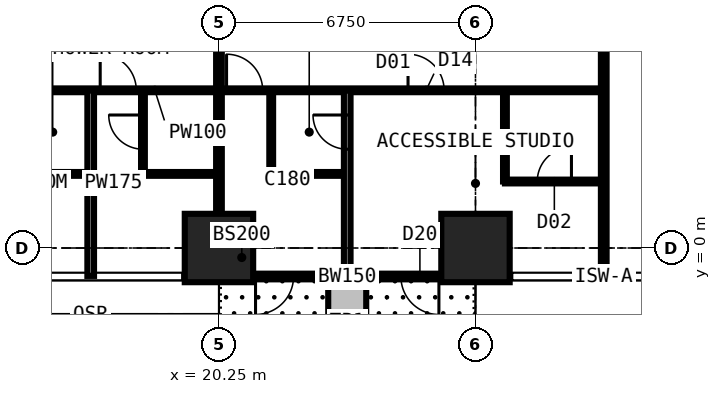
"""IFC4 building model, lengths in metres.
Left out: names, types, materials, properties, quantities, classifications, styles, units other than length and angle.
Written with IfcOpenShell. Run it as: python <this file> out.ifc"""

import sys

from ifc_helpers import new_model, si_unit, direction, frame, frame_2d, origin, origin_2d, place, context, subcontext, project, spatial, rectangle, extrude, element, fill, save


model = new_model("IFC4")
c1 = context("Model", 3, precision=1e-05, world=origin(), true_north=direction((0.0, 1.0)))
c2 = subcontext(c1, "Body", "Model", "MODEL_VIEW")
j1 = project(units=[si_unit("LENGTHUNIT", "METRE"), si_unit("PLANEANGLEUNIT", "RADIAN")], contexts=[c1])
p1 = place(None, origin())
s1 = spatial("IfcSite", under=j1, at=p1, CompositionType="ELEMENT")
p2 = place(p1, origin())
s2 = spatial("IfcBuilding", under=s1, at=p2, CompositionType="ELEMENT")
p3 = place(p2, frame((0.0, 0.0, 57.6)))
s3 = spatial("IfcBuildingStorey", under=s2, at=p3, CompositionType="ELEMENT", Elevation=57.6)
for number, where, z_axis, x_axis in (
    (1, (20.25, 0.0, 0.0), (0.0, 0.0, 1.0), (1.0, 0.0, 0.0)),
    (2, (27.0, 0.0, 0.0), (0.0, 0.0, 1.0), (1.0, 0.0, 0.0)),
):
    element("IfcColumn", number, at=place(p3, frame(where, z_axis=z_axis, x_axis=x_axis)), inside=s3, PredefinedType="COLUMN", context=c2, shape_type="SweptSolid", body=[
        extrude(rectangle(XDim=1.8, YDim=1.8, at=origin_2d()), origin(), (0.0, 0.0, 1.0), 3.6),
    ])
p4 = place(p3, frame((27.0, -0.75, 0.0), z_axis=(0.0, 0.0, 1.0), x_axis=(-1.0, 0.0, 0.0)))
e3 = element("IfcWall", 3, at=p4, inside=s3, PredefinedType="SOLIDWALL", context=c2, shape_type="SweptSolid", body=[
    extrude(rectangle(XDim=6.75, YDim=0.15, at=frame_2d((3.375, 0.0))), origin(), (0.0, 0.0, 1.0), 3.375),
])
p5 = place(p4, frame((0.962, 0.0, 0.0)))
e4 = element("IfcOpeningElement", 4, at=p5, cuts=e3, PredefinedType="OPENING", context=c2, shape_type="SweptSolid", body=[
    extrude(rectangle(XDim=1.0, YDim=2.2, at=frame_2d((0.5, 1.1))), frame((0.0, 0.085, 0.0), z_axis=(0.0, -1.0, 0.0), x_axis=(1.0, 0.0, 0.0)), (0.0, 0.0, 1.0), 0.17),
])
p6 = place(p4, frame((2.025, 0.0, 0.9)))
e5 = element("IfcOpeningElement", 5, at=p6, cuts=e3, PredefinedType="OPENING", context=c2, shape_type="SweptSolid", body=[
    extrude(rectangle(XDim=1.2, YDim=1.8, at=frame_2d((0.6, 0.9))), frame((0.0, 0.085, 0.0), z_axis=(0.0, -1.0, 0.0), x_axis=(1.0, 0.0, 0.0)), (0.0, 0.0, 1.0), 0.17),
])
p7 = place(p4, frame((4.788, 0.0, 0.0)))
e6 = element("IfcOpeningElement", 6, at=p7, cuts=e3, PredefinedType="OPENING", context=c2, shape_type="SweptSolid", body=[
    extrude(rectangle(XDim=1.0, YDim=2.2, at=frame_2d((0.5, 1.1))), frame((0.0, 0.085, 0.0), z_axis=(0.0, -1.0, 0.0), x_axis=(1.0, 0.0, 0.0)), (0.0, 0.0, 1.0), 0.17),
])
p8 = place(p4, frame((3.525, 0.0, 0.9)))
e7 = element("IfcOpeningElement", 7, at=p8, cuts=e3, PredefinedType="OPENING", context=c2, shape_type="SweptSolid", body=[
    extrude(rectangle(XDim=1.2, YDim=1.8, at=frame_2d((0.6, 0.9))), frame((0.0, 0.085, 0.0), z_axis=(0.0, -1.0, 0.0), x_axis=(1.0, 0.0, 0.0)), (0.0, 0.0, 1.0), 0.17),
])
p9 = place(p3, frame((23.625, -0.85, 0.0), z_axis=(0.0, 0.0, 1.0), x_axis=(0.0, -1.0, 0.0)))
e8 = element("IfcWall", 8, at=p9, inside=s3, PredefinedType="USERDEFINED", context=c2, shape_type="SweptSolid", body=[
    extrude(rectangle(XDim=2.2, YDim=1.0, at=frame_2d((1.1, 0.0))), origin(), (0.0, 0.0, 1.0), 0.9),
])
p10 = place(p3, frame((6.75, 4.15, 0.0), z_axis=(0.0, 0.0, 1.0), x_axis=(1.0, 0.0, 0.0)))
e9 = element("IfcWall", 9, at=p10, inside=s3, PredefinedType="PARTITIONING", context=c2, shape_type="SweptSolid", body=[
    extrude(rectangle(XDim=23.625, YDim=0.1, at=frame_2d((11.812, 0.0))), origin(), (0.0, 0.0, 1.0), 3.375),
])
p11 = place(p10, frame((2.85, 0.0, 0.0)))
e10 = element("IfcOpeningElement", 10, at=p11, cuts=e9, PredefinedType="OPENING", context=c2, shape_type="SweptSolid", body=[
    extrude(rectangle(XDim=1.0, YDim=2.2, at=frame_2d((0.5, 1.1))), frame((0.0, 0.06, 0.0), z_axis=(0.0, -1.0, 0.0), x_axis=(1.0, 0.0, 0.0)), (0.0, 0.0, 1.0), 0.12),
])
p12 = place(p10, frame((6.95, 0.0, 0.0)))
e11 = element("IfcOpeningElement", 11, at=p12, cuts=e9, PredefinedType="OPENING", context=c2, shape_type="SweptSolid", body=[
    extrude(rectangle(XDim=0.95, YDim=2.2, at=frame_2d((0.475, 1.1))), frame((0.0, 0.06, 0.0), z_axis=(0.0, -1.0, 0.0), x_axis=(1.0, 0.0, 0.0)), (0.0, 0.0, 1.0), 0.12),
])
p13 = place(p10, frame((10.375, 0.0, 0.0)))
e12 = element("IfcOpeningElement", 12, at=p13, cuts=e9, PredefinedType="OPENING", context=c2, shape_type="SweptSolid", body=[
    extrude(rectangle(XDim=0.95, YDim=2.2, at=frame_2d((0.475, 1.1))), frame((0.0, 0.06, 0.0), z_axis=(0.0, -1.0, 0.0), x_axis=(1.0, 0.0, 0.0)), (0.0, 0.0, 1.0), 0.12),
])
p14 = place(p10, frame((18.475, 0.0, 0.0)))
e13 = element("IfcOpeningElement", 13, at=p14, cuts=e9, PredefinedType="OPENING", context=c2, shape_type="SweptSolid", body=[
    extrude(rectangle(XDim=0.95, YDim=2.2, at=frame_2d((0.475, 1.1))), frame((0.0, 0.06, 0.0), z_axis=(0.0, -1.0, 0.0), x_axis=(1.0, 0.0, 0.0)), (0.0, 0.0, 1.0), 0.12),
])
p15 = place(p10, frame((13.7, 0.0, 0.0)))
e14 = element("IfcOpeningElement", 14, at=p15, cuts=e9, PredefinedType="OPENING", context=c2, shape_type="SweptSolid", body=[
    extrude(rectangle(XDim=0.95, YDim=2.2, at=frame_2d((0.475, 1.1))), frame((0.0, 0.06, 0.0), z_axis=(0.0, -1.0, 0.0), x_axis=(1.0, 0.0, 0.0)), (0.0, 0.0, 1.0), 0.12),
])
p16 = place(p3, frame((14.875, 1.95, 0.0), z_axis=(0.0, 0.0, 1.0), x_axis=(1.0, 0.0, 0.0)))
e15 = element("IfcWall", 15, at=p16, inside=s3, PredefinedType="PARTITIONING", context=c2, shape_type="SweptSolid", body=[
    extrude(rectangle(XDim=2.0, YDim=0.1, at=frame_2d((1.0, 0.0))), origin(), (0.0, 0.0, 1.0), 3.375),
])
p17 = place(p3, frame((16.875, -0.734, 0.0), z_axis=(0.0, 0.0, 1.0), x_axis=(0.0, 1.0, 0.0)))
e16 = element("IfcWall", 16, at=p17, inside=s3, PredefinedType="PARTITIONING", context=c2, shape_type="SweptSolid", body=[
    extrude(rectangle(XDim=4.884, YDim=0.175, at=frame_2d((2.442, 0.0))), origin(), (0.0, 0.0, 1.0), 3.375),
])
p18 = place(p3, frame((18.25, 1.95, 0.0), z_axis=(0.0, 0.0, 1.0), x_axis=(0.0, 1.0, 0.0)))
e17 = element("IfcWall", 17, at=p18, inside=s3, PredefinedType="PARTITIONING", context=c2, shape_type="SweptSolid", body=[
    extrude(rectangle(XDim=2.2, YDim=0.1, at=frame_2d((1.1, 0.0))), origin(), (0.0, 0.0, 1.0), 3.375),
])
p19 = place(p18, frame((0.65, 0.0, 0.0)))
e18 = element("IfcOpeningElement", 18, at=p19, cuts=e17, PredefinedType="OPENING", context=c2, shape_type="SweptSolid", body=[
    extrude(rectangle(XDim=0.9, YDim=2.2, at=frame_2d((0.45, 1.1))), frame((0.0, 0.06, 0.0), z_axis=(0.0, -1.0, 0.0), x_axis=(1.0, 0.0, 0.0)), (0.0, 0.0, 1.0), 0.12),
])
p20 = place(p3, frame((18.25, 1.95, 0.0), z_axis=(0.0, 0.0, 1.0), x_axis=(1.0, 0.0, 0.0)))
e19 = element("IfcWall", 19, at=p20, inside=s3, PredefinedType="PARTITIONING", context=c2, shape_type="SweptSolid", body=[
    extrude(rectangle(XDim=2.0, YDim=0.1, at=frame_2d((1.0, 0.0))), origin(), (0.0, 0.0, 1.0), 3.375),
])
p21 = place(p3, frame((20.25, -0.734, 0.0), z_axis=(0.0, 0.0, 1.0), x_axis=(0.0, 1.0, 0.0)))
e20 = element("IfcWall", 20, at=p21, inside=s3, PredefinedType="PARTITIONING", context=c2, shape_type="SweptSolid", body=[
    extrude(rectangle(XDim=12.034, YDim=0.15, at=frame_2d((6.017, 0.0))), origin(), (0.0, 0.0, 1.0), 2.61),
])
p22 = place(p3, frame((21.625, 1.95, 0.0), z_axis=(0.0, 0.0, 1.0), x_axis=(0.0, 1.0, 0.0)))
e21 = element("IfcWall", 21, at=p22, inside=s3, PredefinedType="PARTITIONING", context=c2, shape_type="SweptSolid", body=[
    extrude(rectangle(XDim=2.2, YDim=0.1, at=frame_2d((1.1, 0.0))), origin(), (0.0, 0.0, 1.0), 3.375),
])
p23 = place(p3, frame((21.625, 1.95, 0.0), z_axis=(0.0, 0.0, 1.0), x_axis=(1.0, 0.0, 0.0)))
e22 = element("IfcWall", 22, at=p23, inside=s3, PredefinedType="PARTITIONING", context=c2, shape_type="SweptSolid", body=[
    extrude(rectangle(XDim=2.0, YDim=0.1, at=frame_2d((1.0, 0.0))), origin(), (0.0, 0.0, 1.0), 3.375),
])
p24 = place(p3, frame((23.625, -0.734, 0.0), z_axis=(0.0, 0.0, 1.0), x_axis=(0.0, 1.0, 0.0)))
e23 = element("IfcWall", 23, at=p24, inside=s3, PredefinedType="PARTITIONING", context=c2, shape_type="SweptSolid", body=[
    extrude(rectangle(XDim=4.884, YDim=0.175, at=frame_2d((2.442, 0.0))), origin(), (0.0, 0.0, 1.0), 3.375),
])
p25 = place(p24, frame((3.334, 0.0, 0.0)))
e24 = element("IfcOpeningElement", 24, at=p25, cuts=e23, PredefinedType="OPENING", context=c2, shape_type="SweptSolid", body=[
    extrude(rectangle(XDim=0.9, YDim=2.2, at=frame_2d((0.45, 1.1))), frame((0.0, 0.097, 0.0), z_axis=(0.0, -1.0, 0.0), x_axis=(1.0, 0.0, 0.0)), (0.0, 0.0, 1.0), 0.195),
])
p26 = place(p3, frame((27.775, 1.75, 0.0), z_axis=(0.0, 0.0, 1.0), x_axis=(0.0, 1.0, 0.0)))
e25 = element("IfcWall", 25, at=p26, inside=s3, PredefinedType="PARTITIONING", context=c2, shape_type="SweptSolid", body=[
    extrude(rectangle(XDim=2.4, YDim=0.1, at=frame_2d((1.2, 0.0))), origin(), (0.0, 0.0, 1.0), 3.375),
])
p27 = place(p3, frame((27.775, 1.75, 0.0), z_axis=(0.0, 0.0, 1.0), x_axis=(1.0, 0.0, 0.0)))
e26 = element("IfcWall", 26, at=p27, inside=s3, PredefinedType="PARTITIONING", context=c2, shape_type="SweptSolid", body=[
    extrude(rectangle(XDim=2.6, YDim=0.1, at=frame_2d((1.3, 0.0))), origin(), (0.0, 0.0, 1.0), 3.375),
])
p28 = place(p27, frame((0.85, 0.0, 0.0)))
e27 = element("IfcOpeningElement", 27, at=p28, cuts=e26, PredefinedType="OPENING", context=c2, shape_type="SweptSolid", body=[
    extrude(rectangle(XDim=0.9, YDim=2.2, at=frame_2d((0.45, 1.1))), frame((0.0, 0.06, 0.0), z_axis=(0.0, -1.0, 0.0), x_axis=(1.0, 0.0, 0.0)), (0.0, 0.0, 1.0), 0.12),
])
p29 = place(p3, frame((30.375, -0.734, 0.0), z_axis=(0.0, 0.0, 1.0), x_axis=(0.0, 1.0, 0.0)))
e28 = element("IfcWall", 28, at=p29, inside=s3, PredefinedType="PARTITIONING", context=c2, shape_type="SweptSolid", body=[
    extrude(rectangle(XDim=12.034, YDim=0.15, at=frame_2d((6.017, 0.0))), origin(), (0.0, 0.0, 1.0), 3.375),
])
p30 = place(p5, origin())
e29 = element("IfcDoor", 29, at=p30, inside=s3, OperationType="SINGLE_SWING_LEFT", PredefinedType="DOOR", context=c2, shape_type="SweptSolid", body=[
    extrude(rectangle(XDim=1.0, YDim=2.2, at=frame_2d((0.5, 1.1))), frame((0.0, 0.025, 0.0), z_axis=(0.0, -1.0, 0.0), x_axis=(1.0, 0.0, 0.0)), (0.0, 0.0, 1.0), 0.05),
])
fill(e4, e29)
p31 = place(p6, origin())
e30 = element("IfcWindow", 30, at=p31, inside=s3, PartitioningType="SINGLE_PANEL", PredefinedType="WINDOW", context=c2, shape_type="SweptSolid", body=[
    extrude(rectangle(XDim=1.2, YDim=1.8, at=frame_2d((0.6, 0.9))), frame((0.0, 0.03, 0.0), z_axis=(0.0, -1.0, 0.0), x_axis=(1.0, 0.0, 0.0)), (0.0, 0.0, 1.0), 0.06),
])
fill(e5, e30)
p32 = place(p7, origin())
e31 = element("IfcDoor", 31, at=p32, inside=s3, OperationType="SINGLE_SWING_RIGHT", PredefinedType="DOOR", context=c2, shape_type="SweptSolid", body=[
    extrude(rectangle(XDim=1.0, YDim=2.2, at=frame_2d((0.5, 1.1))), frame((0.0, 0.025, 0.0), z_axis=(0.0, -1.0, 0.0), x_axis=(1.0, 0.0, 0.0)), (0.0, 0.0, 1.0), 0.05),
])
fill(e6, e31)
p33 = place(p8, origin())
e32 = element("IfcWindow", 32, at=p33, inside=s3, PartitioningType="SINGLE_PANEL", PredefinedType="WINDOW", context=c2, shape_type="SweptSolid", body=[
    extrude(rectangle(XDim=1.2, YDim=1.8, at=frame_2d((0.6, 0.9))), frame((0.0, 0.03, 0.0), z_axis=(0.0, -1.0, 0.0), x_axis=(1.0, 0.0, 0.0)), (0.0, 0.0, 1.0), 0.06),
])
fill(e7, e32)
p34 = place(p13, origin())
e33 = element("IfcDoor", 33, at=p34, inside=s3, OperationType="SINGLE_SWING_LEFT", PredefinedType="DOOR", context=c2, shape_type="SweptSolid", body=[
    extrude(rectangle(XDim=0.95, YDim=2.2, at=frame_2d((0.475, 1.1))), frame((0.0, 0.025, 0.0), z_axis=(0.0, -1.0, 0.0), x_axis=(1.0, 0.0, 0.0)), (0.0, 0.0, 1.0), 0.05),
])
fill(e12, e33)
p35 = place(p19, origin())
e34 = element("IfcDoor", 34, at=p35, inside=s3, OperationType="SINGLE_SWING_RIGHT", PredefinedType="DOOR", context=c2, shape_type="SweptSolid", body=[
    extrude(rectangle(XDim=0.9, YDim=2.2, at=frame_2d((0.45, 1.1))), frame((0.0, 0.025, 0.0), z_axis=(0.0, -1.0, 0.0), x_axis=(1.0, 0.0, 0.0)), (0.0, 0.0, 1.0), 0.05),
])
fill(e18, e34)
p36 = place(p14, origin())
e35 = element("IfcDoor", 35, at=p36, inside=s3, OperationType="SINGLE_SWING_LEFT", PredefinedType="DOOR", context=c2, shape_type="SweptSolid", body=[
    extrude(rectangle(XDim=0.95, YDim=2.2, at=frame_2d((0.475, 1.1))), frame((0.0, 0.025, 0.0), z_axis=(0.0, -1.0, 0.0), x_axis=(1.0, 0.0, 0.0)), (0.0, 0.0, 1.0), 0.05),
])
fill(e13, e35)
p37 = place(p28, origin())
e36 = element("IfcDoor", 36, at=p37, inside=s3, OperationType="SINGLE_SWING_RIGHT", PredefinedType="DOOR", context=c2, shape_type="SweptSolid", body=[
    extrude(rectangle(XDim=0.9, YDim=2.2, at=frame_2d((0.45, 1.1))), frame((0.0, 0.025, 0.0), z_axis=(0.0, -1.0, 0.0), x_axis=(1.0, 0.0, 0.0)), (0.0, 0.0, 1.0), 0.05),
])
fill(e27, e36)
p38 = place(p15, origin())
e37 = element("IfcDoor", 37, at=p38, inside=s3, OperationType="SINGLE_SWING_LEFT", PredefinedType="DOOR", context=c2, shape_type="SweptSolid", body=[
    extrude(rectangle(XDim=0.95, YDim=2.2, at=frame_2d((0.475, 1.1))), frame((0.0, 0.025, 0.0), z_axis=(0.0, -1.0, 0.0), x_axis=(1.0, 0.0, 0.0)), (0.0, 0.0, 1.0), 0.05),
])
fill(e14, e37)
p39 = place(p25, origin())
e38 = element("IfcDoor", 38, at=p39, inside=s3, OperationType="SINGLE_SWING_RIGHT", PredefinedType="DOOR", context=c2, shape_type="SweptSolid", body=[
    extrude(rectangle(XDim=0.9, YDim=2.2, at=frame_2d((0.45, 1.1))), frame((0.0, 0.025, 0.0), z_axis=(0.0, -1.0, 0.0), x_axis=(1.0, 0.0, 0.0)), (0.0, 0.0, 1.0), 0.05),
])
fill(e24, e38)
save(model, sys.argv[1])
